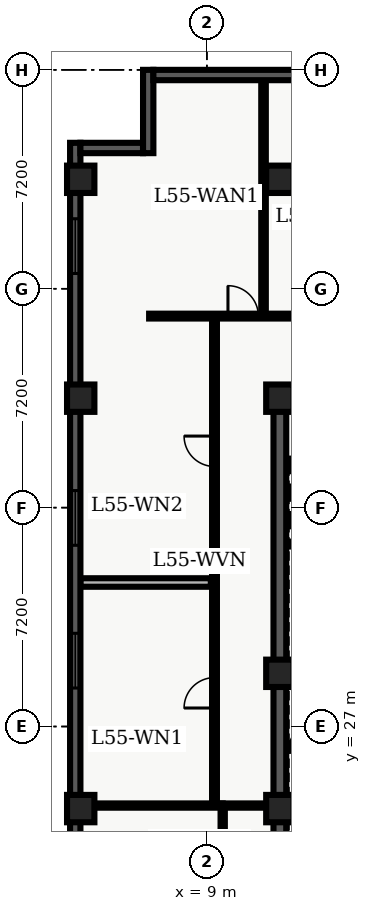
"""IFC4 building model, lengths in metres.
Left out: names, types, materials, properties, quantities, classifications, styles, units other than length and angle.
Written with IfcOpenShell. Run it as: python <this file> out.ifc"""

import sys

from ifc_helpers import new_model, entity, si_unit, converted_unit, direction, frame, origin_with_axes, origin_2d_with_axis, place, context, subcontext, project, spatial, polyline, rectangle, outline, extrude, element, fill, save


model = new_model("IFC4")
c1 = context("Model", 3, precision=1e-05, world=origin_with_axes(), true_north=direction((0.0, 1.0)))
c2 = subcontext(c1, "Body", "Model", "MODEL_VIEW")
j1 = project(units=[si_unit("LENGTHUNIT", "METRE"), converted_unit("PLANEANGLEUNIT", "DEGREE", entity("IfcPlaneAngleMeasure", 0.017), si_unit("PLANEANGLEUNIT", "RADIAN"), dimensions=[0, 0, 0, 0, 0, 0, 0])], contexts=[c1])
p1 = place(None, origin_with_axes())
s1 = spatial("IfcSite", under=j1, at=p1, CompositionType="ELEMENT")
p2 = place(p1, origin_with_axes())
s2 = spatial("IfcBuilding", under=s1, at=p2, CompositionType="ELEMENT")
p3 = place(p2, frame((0.0, 0.0, 224.7), z_axis=(0.0, 0.0, 1.0), x_axis=(1.0, 0.0, 0.0)))
s3 = spatial("IfcBuildingStorey", under=s2, at=p3, CompositionType="ELEMENT", Elevation=224.7)
p4 = place(p3, frame((11.4, 10.8, 0.0), z_axis=(0.0, 0.0, 1.0), x_axis=(0.0, 1.0, 0.0)))
e1 = element("IfcWall", 1, at=p4, inside=s3, PredefinedType="SHEAR", context=c2, shape_type="SweptSolid", body=[
    extrude(outline(polyline([(0.0, -0.21), (27.0, -0.21), (27.0, 0.21), (0.0, 0.21), (0.0, -0.21)])), origin_with_axes(), (0.0, 0.0, 1.0), 3.66),
])
p5 = place(p3, frame((11.4, 37.8, 0.0), z_axis=(0.0, 0.0, 1.0), x_axis=(1.0, 0.0, 0.0)))
e2 = element("IfcWall", 2, at=p5, inside=s3, PredefinedType="SHEAR", context=c2, shape_type="SweptSolid", body=[
    extrude(outline(polyline([(0.0, -0.21), (7.2, -0.21), (7.2, 0.21), (0.0, 0.21), (0.0, -0.21)])), origin_with_axes(), (0.0, 0.0, 1.0), 3.66),
])
p6 = place(p5, frame((2.625, 0.0, 0.0), z_axis=(0.0, 0.0, 1.0), x_axis=(1.0, 0.0, 0.0)))
e3 = element("IfcOpeningElement", 3, at=p6, cuts=e2, PredefinedType="OPENING", context=c2, shape_type="SweptSolid", body=[
    extrude(rectangle(XDim=1.05, YDim=0.44, at=origin_2d_with_axis()), origin_with_axes(), (0.0, 0.0, 1.0), 2.15),
])
p7 = place(p3, frame((11.61, 28.775, 0.0), z_axis=(0.0, 0.0, 1.0), x_axis=(1.0, 0.0, 0.0)))
e4 = element("IfcWall", 4, at=p7, inside=s3, PredefinedType="SHEAR", context=c2, shape_type="SweptSolid", body=[
    extrude(outline(polyline([(0.0, -0.125), (6.78, -0.125), (6.78, 0.125), (0.0, 0.125), (0.0, -0.125)])), origin_with_axes(), (0.0, 0.0, 1.0), 3.66),
])
p8 = place(p3, frame((11.7, 24.1, 0.0), z_axis=(0.0, 0.0, 1.0), x_axis=(1.0, 0.0, 0.0)))
e5 = element("IfcWall", 5, at=p8, inside=s3, PredefinedType="SOLIDWALL", context=c2, shape_type="SweptSolid", body=[
    extrude(outline(polyline([(0.0, -0.125), (6.6, -0.125), (6.6, 0.125), (0.0, 0.125), (0.0, -0.125)])), origin_with_axes(), (0.0, 0.0, 1.0), 2.7),
])
p9 = place(p8, frame((3.75, 0.0, 0.0), z_axis=(0.0, 0.0, 1.0), x_axis=(1.0, 0.0, 0.0)))
e6 = element("IfcOpeningElement", 6, at=p9, cuts=e5, PredefinedType="OPENING", context=c2, shape_type="SweptSolid", body=[
    extrude(rectangle(XDim=0.9, YDim=0.27, at=origin_2d_with_axis()), origin_with_axes(), (0.0, 0.0, 1.0), 2.15),
])
p10 = place(p3, frame((11.7, 26.325, 0.0), z_axis=(0.0, 0.0, 1.0), x_axis=(1.0, 0.0, 0.0)))
e7 = element("IfcWall", 7, at=p10, inside=s3, PredefinedType="SOLIDWALL", context=c2, shape_type="SweptSolid", body=[
    extrude(outline(polyline([(0.0, -0.125), (6.6, -0.125), (6.6, 0.125), (0.0, 0.125), (0.0, -0.125)])), origin_with_axes(), (0.0, 0.0, 1.0), 2.7),
])
p11 = place(p10, frame((3.5, 0.0, 0.0), z_axis=(0.0, 0.0, 1.0), x_axis=(1.0, 0.0, 0.0)))
e8 = element("IfcOpeningElement", 8, at=p11, cuts=e7, PredefinedType="OPENING", context=c2, shape_type="SweptSolid", body=[
    extrude(rectangle(XDim=0.9, YDim=0.27, at=origin_2d_with_axis()), origin_with_axes(), (0.0, 0.0, 1.0), 2.15),
])
for number, where, z_axis, x_axis in (
    (9, (11.4, 24.3, 0.0), (0.0, 0.0, 1.0), (1.0, 0.0, 0.0)),
    (10, (11.4, 28.75, 0.0), (0.0, 0.0, 1.0), (1.0, 0.0, 0.0)),
    (11, (11.4, 37.8, 0.0), (0.0, 0.0, 1.0), (1.0, 0.0, 0.0)),
    (12, (11.4, 45.0, 0.0), (0.0, 0.0, 1.0), (1.0, 0.0, 0.0)),
    (13, (4.85, 24.3, 0.0), (0.0, 0.0, 1.0), (1.0, 0.0, 0.0)),
    (14, (4.85, 37.8, 0.0), (0.0, 0.0, 1.0), (1.0, 0.0, 0.0)),
    (15, (4.85, 45.0, 0.0), (0.0, 0.0, 1.0), (1.0, 0.0, 0.0)),
):
    element("IfcColumn", number, at=place(p3, frame(where, z_axis=z_axis, x_axis=x_axis)), inside=s3, PredefinedType="COLUMN", context=c2, shape_type="SweptSolid", body=[
        extrude(rectangle(XDim=0.9, YDim=0.9, at=origin_2d_with_axis()), origin_with_axes(), (0.0, 0.0, 1.0), 3.9),
    ])
p12 = place(p3, frame((9.52, 20.4, 0.0), z_axis=(0.0, 0.0, 1.0), x_axis=(0.0, 1.0, 0.0)))
e16 = element("IfcWall", 16, at=p12, inside=s3, PredefinedType="PARTITIONING", context=c2, shape_type="SweptSolid", body=[
    extrude(outline(polyline([(0.0, -0.07), (4.0, -0.07), (4.0, 0.07), (0.0, 0.07), (0.0, -0.07)])), origin_with_axes(), (0.0, 0.0, 1.0), 2.7),
])
p13 = place(p3, frame((9.52, 24.4, 0.0), z_axis=(0.0, 0.0, 1.0), x_axis=(1.0, 0.0, 0.0)))
e17 = element("IfcWall", 17, at=p13, inside=s3, PredefinedType="PARTITIONING", context=c2, shape_type="SweptSolid", body=[
    extrude(outline(polyline([(0.0, -0.07), (1.58, -0.07), (1.58, 0.07), (0.0, 0.07), (0.0, -0.07)])), origin_with_axes(), (0.0, 0.0, 1.0), 2.7),
])
p14 = place(p3, frame((7.1, 40.5, 0.0), z_axis=(0.0, 0.0, 1.0), x_axis=(1.0, 0.0, 0.0)))
e18 = element("IfcWall", 18, at=p14, inside=s3, PredefinedType="PARTITIONING", context=c2, shape_type="SweptSolid", body=[
    extrude(outline(polyline([(0.0, -0.08), (24.965, -0.08), (24.965, 0.08), (0.0, 0.08), (0.0, -0.08)])), origin_with_axes(), (0.0, 0.0, 1.0), 2.7),
])
p15 = place(p14, frame((3.093, 0.0, 0.0), z_axis=(0.0, 0.0, 1.0), x_axis=(1.0, 0.0, 0.0)))
e19 = element("IfcOpeningElement", 19, at=p15, cuts=e18, PredefinedType="OPENING", context=c2, shape_type="SweptSolid", body=[
    extrude(rectangle(XDim=1.0, YDim=0.18, at=origin_2d_with_axis()), origin_with_axes(), (0.0, 0.0, 1.0), 2.15),
])
p16 = place(p14, frame((5.873, 0.0, 0.0), z_axis=(0.0, 0.0, 1.0), x_axis=(1.0, 0.0, 0.0)))
e20 = element("IfcOpeningElement", 20, at=p16, cuts=e18, PredefinedType="OPENING", context=c2, shape_type="SweptSolid", body=[
    extrude(rectangle(XDim=1.0, YDim=0.18, at=origin_2d_with_axis()), origin_with_axes(), (0.0, 0.0, 1.0), 2.15),
])
p17 = place(p14, frame((10.502, 0.0, 0.0), z_axis=(0.0, 0.0, 1.0), x_axis=(1.0, 0.0, 0.0)))
e21 = element("IfcOpeningElement", 21, at=p17, cuts=e18, PredefinedType="OPENING", context=c2, shape_type="SweptSolid", body=[
    extrude(rectangle(XDim=1.0, YDim=0.18, at=origin_2d_with_axis()), origin_with_axes(), (0.0, 0.0, 1.0), 2.15),
])
p18 = place(p3, frame((9.25, 24.4, 0.0), z_axis=(0.0, 0.0, 1.0), x_axis=(0.0, 1.0, 0.0)))
e22 = element("IfcWall", 22, at=p18, inside=s3, PredefinedType="PARTITIONING", context=c2, shape_type="SweptSolid", body=[
    extrude(outline(polyline([(0.0, -0.08), (16.1, -0.08), (16.1, 0.08), (0.0, 0.08), (0.0, -0.08)])), origin_with_axes(), (0.0, 0.0, 1.0), 2.7),
])
p19 = place(p18, frame((3.708, 0.0, 0.0), z_axis=(0.0, 0.0, 1.0), x_axis=(1.0, 0.0, 0.0)))
e23 = element("IfcOpeningElement", 23, at=p19, cuts=e22, PredefinedType="OPENING", context=c2, shape_type="SweptSolid", body=[
    extrude(rectangle(XDim=1.0, YDim=0.18, at=origin_2d_with_axis()), origin_with_axes(), (0.0, 0.0, 1.0), 2.15),
])
p20 = place(p18, frame((11.653, 0.0, 0.0), z_axis=(0.0, 0.0, 1.0), x_axis=(1.0, 0.0, 0.0)))
e24 = element("IfcOpeningElement", 24, at=p20, cuts=e22, PredefinedType="OPENING", context=c2, shape_type="SweptSolid", body=[
    extrude(rectangle(XDim=1.0, YDim=0.18, at=origin_2d_with_axis()), origin_with_axes(), (0.0, 0.0, 1.0), 2.15),
])
p21 = place(p3, frame((4.835, 24.4, 0.0), z_axis=(0.0, 0.0, 1.0), x_axis=(1.0, 0.0, 0.0)))
e25 = element("IfcWall", 25, at=p21, inside=s3, PredefinedType="PARTITIONING", context=c2, shape_type="SweptSolid", body=[
    extrude(outline(polyline([(0.0, -0.07), (4.685, -0.07), (4.685, 0.07), (0.0, 0.07), (0.0, -0.07)])), origin_with_axes(), (0.0, 0.0, 1.0), 2.7),
])
p22 = place(p3, frame((4.835, 31.737, 0.0), z_axis=(0.0, 0.0, 1.0), x_axis=(1.0, 0.0, 0.0)))
e26 = element("IfcWall", 26, at=p22, inside=s3, PredefinedType="PARTITIONING", context=c2, shape_type="SweptSolid", body=[
    extrude(outline(polyline([(0.0, -0.14), (4.295, -0.14), (4.295, 0.14), (0.0, 0.14), (0.0, -0.14)])), origin_with_axes(), (0.0, 0.0, 1.0), 2.7),
])
p23 = place(p3, frame((10.863, 40.6, 0.0), z_axis=(0.0, 0.0, 1.0), x_axis=(0.0, 1.0, 0.0)))
e27 = element("IfcWall", 27, at=p23, inside=s3, PredefinedType="PARTITIONING", context=c2, shape_type="SweptSolid", body=[
    extrude(outline(polyline([(0.0, -0.075), (7.665, -0.075), (7.665, 0.075), (0.0, 0.075), (0.0, -0.075)])), origin_with_axes(), (0.0, 0.0, 1.0), 2.7),
])
p24 = place(p3, frame((4.67, 2.74, 0.0), z_axis=(0.0, 0.0, 1.0), x_axis=(0.0, 1.0, 0.0)))
e28 = element("IfcWall", 28, at=p24, inside=s3, PredefinedType="SOLIDWALL", context=c2, shape_type="SweptSolid", body=[
    extrude(outline(polyline([(0.0, -0.17), (43.46, -0.17), (43.46, 0.17), (0.0, 0.17), (0.0, -0.17)])), origin_with_axes(), (0.0, 0.0, 1.0), 3.66),
])
p25 = place(p24, frame((2.948, 0.0, 0.45), z_axis=(0.0, 0.0, 1.0), x_axis=(1.0, 0.0, 0.0)))
e29 = element("IfcOpeningElement", 29, at=p25, cuts=e28, PredefinedType="OPENING", context=c2, shape_type="SweptSolid", body=[
    extrude(rectangle(XDim=1.8, YDim=0.36, at=origin_2d_with_axis()), origin_with_axes(), (0.0, 0.0, 1.0), 2.1),
])
p26 = place(p24, frame((12.339, 0.0, 0.45), z_axis=(0.0, 0.0, 1.0), x_axis=(1.0, 0.0, 0.0)))
e30 = element("IfcOpeningElement", 30, at=p26, cuts=e28, PredefinedType="OPENING", context=c2, shape_type="SweptSolid", body=[
    extrude(rectangle(XDim=1.8, YDim=0.36, at=origin_2d_with_axis()), origin_with_axes(), (0.0, 0.0, 1.0), 2.1),
])
p27 = place(p24, frame((16.184, 0.0, 0.45), z_axis=(0.0, 0.0, 1.0), x_axis=(1.0, 0.0, 0.0)))
e31 = element("IfcOpeningElement", 31, at=p27, cuts=e28, PredefinedType="OPENING", context=c2, shape_type="SweptSolid", body=[
    extrude(rectangle(XDim=1.8, YDim=0.36, at=origin_2d_with_axis()), origin_with_axes(), (0.0, 0.0, 1.0), 2.1),
])
p28 = place(p24, frame((26.426, 0.0, 0.45), z_axis=(0.0, 0.0, 1.0), x_axis=(1.0, 0.0, 0.0)))
e32 = element("IfcOpeningElement", 32, at=p28, cuts=e28, PredefinedType="OPENING", context=c2, shape_type="SweptSolid", body=[
    extrude(rectangle(XDim=1.8, YDim=0.36, at=origin_2d_with_axis()), origin_with_axes(), (0.0, 0.0, 1.0), 2.1),
])
p29 = place(p24, frame((31.121, 0.0, 0.45), z_axis=(0.0, 0.0, 1.0), x_axis=(1.0, 0.0, 0.0)))
e33 = element("IfcOpeningElement", 33, at=p29, cuts=e28, PredefinedType="OPENING", context=c2, shape_type="SweptSolid", body=[
    extrude(rectangle(XDim=1.8, YDim=0.36, at=origin_2d_with_axis()), origin_with_axes(), (0.0, 0.0, 1.0), 2.1),
])
p30 = place(p24, frame((40.062, 0.0, 0.45), z_axis=(0.0, 0.0, 1.0), x_axis=(1.0, 0.0, 0.0)))
e34 = element("IfcOpeningElement", 34, at=p30, cuts=e28, PredefinedType="OPENING", context=c2, shape_type="SweptSolid", body=[
    extrude(rectangle(XDim=1.8, YDim=0.36, at=origin_2d_with_axis()), origin_with_axes(), (0.0, 0.0, 1.0), 2.1),
])
p31 = place(p3, frame((4.84, 46.03, 0.0), z_axis=(0.0, 0.0, 1.0), x_axis=(1.0, 0.0, 0.0)))
e35 = element("IfcWall", 35, at=p31, inside=s3, PredefinedType="SOLIDWALL", context=c2, shape_type="SweptSolid", body=[
    extrude(outline(polyline([(0.0, -0.17), (2.06, -0.17), (2.06, 0.17), (0.0, 0.17), (0.0, -0.17)])), origin_with_axes(), (0.0, 0.0, 1.0), 3.66),
])
p32 = place(p3, frame((7.07, 45.86, 0.0), z_axis=(0.0, 0.0, 1.0), x_axis=(0.0, 1.0, 0.0)))
e36 = element("IfcWall", 36, at=p32, inside=s3, PredefinedType="SOLIDWALL", context=c2, shape_type="SweptSolid", body=[
    extrude(outline(polyline([(0.0, -0.17), (2.74, -0.17), (2.74, 0.17), (0.0, 0.17), (0.0, -0.17)])), origin_with_axes(), (0.0, 0.0, 1.0), 3.66),
])
p33 = place(p3, frame((7.24, 48.43, 0.0), z_axis=(0.0, 0.0, 1.0), x_axis=(1.0, 0.0, 0.0)))
e37 = element("IfcWall", 37, at=p33, inside=s3, PredefinedType="SOLIDWALL", context=c2, shape_type="SweptSolid", body=[
    extrude(outline(polyline([(0.0, -0.17), (18.36, -0.17), (18.36, 0.17), (0.0, 0.17), (0.0, -0.17)])), origin_with_axes(), (0.0, 0.0, 1.0), 3.66),
])
p34 = place(p33, frame((9.63, 0.0, 0.45), z_axis=(0.0, 0.0, 1.0), x_axis=(1.0, 0.0, 0.0)))
e38 = element("IfcOpeningElement", 38, at=p34, cuts=e37, PredefinedType="OPENING", context=c2, shape_type="SweptSolid", body=[
    extrude(rectangle(XDim=1.8, YDim=0.36, at=origin_2d_with_axis()), origin_with_axes(), (0.0, 0.0, 1.0), 2.1),
])
p35 = place(p33, frame((14.9, 0.0, 0.45), z_axis=(0.0, 0.0, 1.0), x_axis=(1.0, 0.0, 0.0)))
e39 = element("IfcOpeningElement", 39, at=p35, cuts=e37, PredefinedType="OPENING", context=c2, shape_type="SweptSolid", body=[
    extrude(rectangle(XDim=1.8, YDim=0.36, at=origin_2d_with_axis()), origin_with_axes(), (0.0, 0.0, 1.0), 2.1),
])
p36 = place(p18, frame((3.708, 0.0, 0.0), z_axis=(0.0, 0.0, 1.0), x_axis=(1.0, 0.0, 0.0)))
e40 = element("IfcDoor", 40, at=p36, inside=s3, OperationType="SINGLE_SWING_LEFT", PredefinedType="DOOR", context=c2, shape_type="SweptSolid", body=[
    extrude(rectangle(XDim=1.0, YDim=0.09, at=origin_2d_with_axis()), origin_with_axes(), (0.0, 0.0, 1.0), 2.15),
])
fill(e23, e40)
p37 = place(p18, frame((11.653, 0.0, 0.0), z_axis=(0.0, 0.0, 1.0), x_axis=(1.0, 0.0, 0.0)))
e41 = element("IfcDoor", 41, at=p37, inside=s3, OperationType="SINGLE_SWING_RIGHT", PredefinedType="DOOR", context=c2, shape_type="SweptSolid", body=[
    extrude(rectangle(XDim=1.0, YDim=0.09, at=origin_2d_with_axis()), origin_with_axes(), (0.0, 0.0, 1.0), 2.15),
])
fill(e24, e41)
p38 = place(p14, frame((3.093, 0.0, 0.0), z_axis=(0.0, 0.0, 1.0), x_axis=(1.0, 0.0, 0.0)))
e42 = element("IfcDoor", 42, at=p38, inside=s3, OperationType="SINGLE_SWING_LEFT", PredefinedType="DOOR", context=c2, shape_type="SweptSolid", body=[
    extrude(rectangle(XDim=1.0, YDim=0.09, at=origin_2d_with_axis()), origin_with_axes(), (0.0, 0.0, 1.0), 2.15),
])
fill(e19, e42)
p39 = place(p24, frame((26.426, 0.0, 0.45), z_axis=(0.0, 0.0, 1.0), x_axis=(1.0, 0.0, 0.0)))
e43 = element("IfcWindow", 43, at=p39, inside=s3, PredefinedType="WINDOW", context=c2, shape_type="SweptSolid", body=[
    extrude(rectangle(XDim=1.8, YDim=0.09, at=origin_2d_with_axis()), origin_with_axes(), (0.0, 0.0, 1.0), 2.1),
])
fill(e32, e43)
p40 = place(p24, frame((31.121, 0.0, 0.45), z_axis=(0.0, 0.0, 1.0), x_axis=(1.0, 0.0, 0.0)))
e44 = element("IfcWindow", 44, at=p40, inside=s3, PredefinedType="WINDOW", context=c2, shape_type="SweptSolid", body=[
    extrude(rectangle(XDim=1.8, YDim=0.09, at=origin_2d_with_axis()), origin_with_axes(), (0.0, 0.0, 1.0), 2.1),
])
fill(e33, e44)
p41 = place(p24, frame((40.062, 0.0, 0.45), z_axis=(0.0, 0.0, 1.0), x_axis=(1.0, 0.0, 0.0)))
e45 = element("IfcWindow", 45, at=p41, inside=s3, PredefinedType="WINDOW", context=c2, shape_type="SweptSolid", body=[
    extrude(rectangle(XDim=1.8, YDim=0.09, at=origin_2d_with_axis()), origin_with_axes(), (0.0, 0.0, 1.0), 2.1),
])
fill(e34, e45)
save(model, sys.argv[1])
